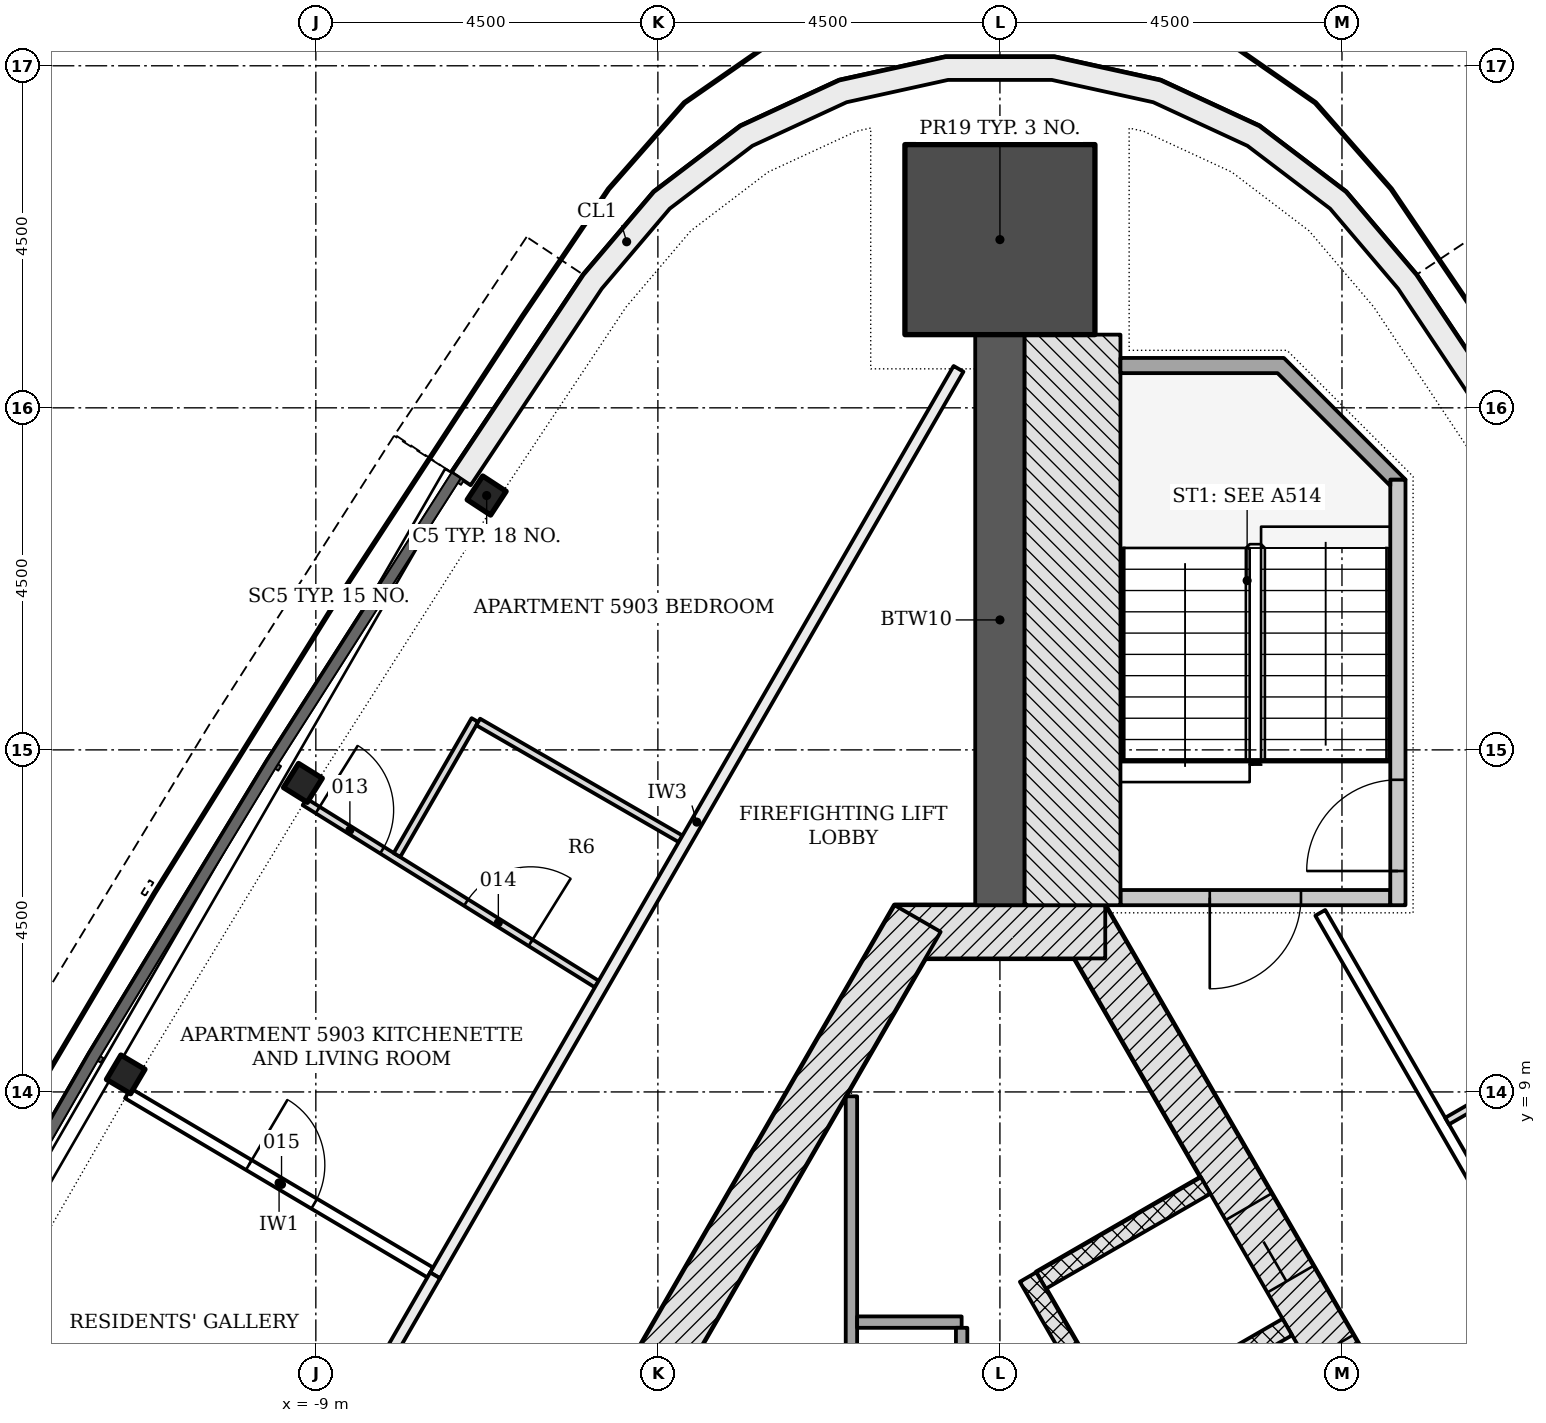
"""IFC4 building model, lengths in metres.
Left out: names, types, materials, properties, quantities, classifications, styles, units other than length and angle.
Written with IfcOpenShell. Run it as: python <this file> out.ifc"""

import sys

from ifc_helpers import new_model, si_unit, direction, frame, frame_2d, origin, origin_2d, place, context, subcontext, project, spatial, polyline, rectangle, i_section, outline, extrude, element, fill, save


model = new_model("IFC4")
c1 = context("Model", 3, precision=1e-05, world=origin(), true_north=direction((0.0, 1.0)))
c2 = subcontext(c1, "Body", "Model", "MODEL_VIEW")
j1 = project(units=[si_unit("LENGTHUNIT", "METRE"), si_unit("PLANEANGLEUNIT", "RADIAN")], contexts=[c1])
p1 = place(None, origin())
s1 = spatial("IfcSite", under=j1, at=p1, CompositionType="ELEMENT")
p2 = place(p1, origin())
s2 = spatial("IfcBuilding", under=s1, at=p2, CompositionType="ELEMENT")
p3 = place(p2, frame((0.0, 0.0, 229.2)))
s3 = spatial("IfcBuildingStorey", under=s2, at=p3, CompositionType="ELEMENT", Elevation=229.2)
p4 = place(p3, frame((10.311, -4.703, -0.2), z_axis=(0.0, 0.0, 1.0), x_axis=(-0.500001446645, 0.866024568562, 0.0)))
e1 = element("IfcWall", 1, at=p4, inside=s3, PredefinedType="SHEAR", context=c2, shape_type="SweptSolid", body=[
    extrude(rectangle(XDim=18.458, YDim=0.7, at=frame_2d((9.229, 0.0))), origin(), (0.0, 0.0, 1.0), 3.6),
])
p5 = place(p4, frame((4.379, 0.0, 0.2)))
e2 = element("IfcOpeningElement", 2, at=p5, cuts=e1, PredefinedType="OPENING", context=c2, shape_type="SweptSolid", body=[
    extrude(rectangle(XDim=1.1, YDim=2.1, at=frame_2d((0.55, 1.05))), frame((0.0, 0.36, 0.0), z_axis=(0.0, -1.0, 0.0), x_axis=(1.0, 0.0, 0.0)), (0.0, 0.0, 1.0), 0.72),
])
p6 = place(p4, frame((6.529, 0.0, 0.2)))
e3 = element("IfcOpeningElement", 3, at=p6, cuts=e1, PredefinedType="OPENING", context=c2, shape_type="SweptSolid", body=[
    extrude(rectangle(XDim=1.1, YDim=2.1, at=frame_2d((0.55, 1.05))), frame((0.0, 0.36, 0.0), z_axis=(0.0, -1.0, 0.0), x_axis=(1.0, 0.0, 0.0)), (0.0, 0.0, 1.0), 0.72),
])
p7 = place(p4, frame((8.679, 0.0, 0.2)))
e4 = element("IfcOpeningElement", 4, at=p7, cuts=e1, PredefinedType="OPENING", context=c2, shape_type="SweptSolid", body=[
    extrude(rectangle(XDim=1.1, YDim=2.1, at=frame_2d((0.55, 1.05))), frame((0.0, 0.36, 0.0), z_axis=(0.0, -1.0, 0.0), x_axis=(1.0, 0.0, 0.0)), (0.0, 0.0, 1.0), 0.72),
])
p8 = place(p4, frame((10.829, 0.0, 0.2)))
e5 = element("IfcOpeningElement", 5, at=p8, cuts=e1, PredefinedType="OPENING", context=c2, shape_type="SweptSolid", body=[
    extrude(rectangle(XDim=1.1, YDim=2.1, at=frame_2d((0.55, 1.05))), frame((0.0, 0.36, 0.0), z_axis=(0.0, -1.0, 0.0), x_axis=(1.0, 0.0, 0.0)), (0.0, 0.0, 1.0), 0.72),
])
p9 = place(p4, frame((12.979, 0.0, 0.2)))
e6 = element("IfcOpeningElement", 6, at=p9, cuts=e1, PredefinedType="OPENING", context=c2, shape_type="SweptSolid", body=[
    extrude(rectangle(XDim=1.1, YDim=2.1, at=frame_2d((0.55, 1.05))), frame((0.0, 0.36, 0.0), z_axis=(0.0, -1.0, 0.0), x_axis=(1.0, 0.0, 0.0)), (0.0, 0.0, 1.0), 0.72),
])
p10 = place(p3, frame((1.386, 11.106, -0.2), z_axis=(0.0, 0.0, 1.0), x_axis=(-1.0, 0.0, 0.0)))
e7 = element("IfcWall", 7, at=p10, inside=s3, PredefinedType="SHEAR", context=c2, shape_type="SweptSolid", body=[
    extrude(rectangle(XDim=2.771, YDim=0.7, at=frame_2d((1.386, 0.0))), origin(), (0.0, 0.0, 1.0), 3.6),
])
p11 = place(p3, frame((-1.083, 11.281, -0.2), z_axis=(0.0, 0.0, 1.0), x_axis=(-0.500001446645, -0.866024568562, 0.0)))
e8 = element("IfcWall", 8, at=p11, inside=s3, PredefinedType="SHEAR", context=c2, shape_type="SweptSolid", body=[
    extrude(rectangle(XDim=18.458, YDim=0.7, at=frame_2d((9.229, 0.0))), origin(), (0.0, 0.0, 1.0), 3.6),
])
p12 = place(p11, frame((8.979, 0.0, 0.2)))
e9 = element("IfcOpeningElement", 9, at=p12, cuts=e8, PredefinedType="OPENING", context=c2, shape_type="SweptSolid", body=[
    extrude(rectangle(XDim=1.2, YDim=2.1, at=frame_2d((0.6, 1.05))), frame((0.0, 0.36, 0.0), z_axis=(0.0, -1.0, 0.0), x_axis=(1.0, 0.0, 0.0)), (0.0, 0.0, 1.0), 0.72),
])
p13 = place(p11, frame((11.029, 0.0, 0.2)))
e10 = element("IfcOpeningElement", 10, at=p13, cuts=e8, PredefinedType="OPENING", context=c2, shape_type="SweptSolid", body=[
    extrude(rectangle(XDim=1.2, YDim=2.1, at=frame_2d((0.6, 1.05))), frame((0.0, 0.36, 0.0), z_axis=(0.0, -1.0, 0.0), x_axis=(1.0, 0.0, 0.0)), (0.0, 0.0, 1.0), 0.72),
])
p14 = place(p3, frame((0.0, 11.456, -0.2), z_axis=(0.0, 0.0, 1.0), x_axis=(0.0, 1.0, 0.0)))
e11 = element("IfcWall", 11, at=p14, inside=s3, PredefinedType="SHEAR", context=c2, shape_type="SweptSolid", body=[
    extrude(rectangle(XDim=7.507, YDim=0.65, at=frame_2d((3.753, 0.0))), origin(), (0.0, 0.0, 1.0), 3.6),
])
p15 = place(p3, frame((0.0, 20.213, -0.2), z_axis=(0.0, 0.0, 1.0), x_axis=(0.0, 1.0, 0.0)))
e12 = element("IfcColumn", 12, at=p15, inside=s3, PredefinedType="COLUMN", context=c2, shape_type="SweptSolid", body=[
    extrude(rectangle(XDim=2.5, YDim=2.5, at=origin_2d()), origin(), (0.0, 0.0, 1.0), 3.6),
])
for number, where, z_axis, x_axis in (
    (13, (-6.753, 16.846, -0.2), (0.0, 0.0, 1.0), (-0.548, -0.836, 0.0)),
    (14, (-9.17, 13.065, -0.2), (0.0, 0.0, 1.0), (-0.529, -0.849, 0.0)),
    (15, (-11.501, 9.231, -0.2), (0.0, 0.0, 1.0), (-0.51, -0.86, 0.0)),
):
    element("IfcColumn", number, at=place(p3, frame(where, z_axis=z_axis, x_axis=x_axis)), inside=s3, PredefinedType="COLUMN", context=c2, shape_type="SweptSolid", body=[
        extrude(i_section(OverallWidth=0.373, OverallDepth=0.368, WebThickness=0.015, FlangeThickness=0.024, FilletRadius=0.015, at=origin_2d()), origin(), (0.0, 0.0, 1.0), 3.6),
    ])
p16 = place(p3, origin())
e16 = element("IfcWall", 16, at=p16, inside=s3, PredefinedType="NOTDEFINED", context=c2, shape_type="SweptSolid", body=[
    extrude(outline(polyline([(7.213, 17.148), (5.478, 19.749), (4.551, 20.84), (3.412, 21.706), (2.113, 22.306), (0.716, 22.614), (-0.716, 22.614), (-2.113, 22.306), (-3.412, 21.706), (-4.551, 20.84), (-5.478, 19.749), (-7.213, 17.148), (-6.963, 16.981), (-5.238, 19.568), (-4.344, 20.621), (-3.256, 21.447), (-2.017, 22.021), (-0.683, 22.314), (0.683, 22.314), (2.017, 22.021), (3.256, 21.447), (4.344, 20.621), (5.238, 19.568), (6.963, 16.981), (7.213, 17.148)])), origin(), (0.0, 0.0, 1.0), 3.3),
])
for number, where, z_axis, x_axis in (
    (17, (3.781, 5.907, -0.2), (0.0, 0.0, 1.0), (-0.866, -0.5, 0.0)),
    (18, (2.706, 7.769, -0.2), (0.0, 0.0, 1.0), (-0.866, -0.5, 0.0)),
):
    element("IfcWall", number, at=place(p3, frame(where, z_axis=z_axis, x_axis=x_axis)), inside=s3, PredefinedType="PARTITIONING", context=c2, shape_type="SweptSolid", body=[
        extrude(rectangle(XDim=2.5, YDim=0.25, at=frame_2d((1.25, 0.0))), origin(), (0.0, 0.0, 1.0), 3.6),
    ])
p17 = place(p3, frame((5.87, -2.961, 0.0), z_axis=(0.0, 0.0, 1.0), x_axis=(-0.50000615651, 0.866021849293, 0.0)))
e19 = element("IfcWall", 19, at=p17, inside=s3, PredefinedType="PARTITIONING", context=c2, shape_type="SweptSolid", body=[
    extrude(rectangle(XDim=11.0, YDim=0.25, at=frame_2d((5.5, 0.0))), origin(), (0.0, 0.0, 1.0), 3.4),
])
p18 = place(p3, frame((-1.954, 8.942, 0.0), z_axis=(0.0, 0.0, 1.0), x_axis=(0.0, -1.0, 0.0)))
e20 = element("IfcWall", 20, at=p18, inside=s3, PredefinedType="PARTITIONING", context=c2, shape_type="SweptSolid", body=[
    extrude(rectangle(XDim=15.171, YDim=0.15, at=frame_2d((7.585, 0.0))), origin(), (0.0, 0.0, 1.0), 3.4),
])
p19 = place(p18, frame((7.121, 0.0, 0.0)))
e21 = element("IfcOpeningElement", 21, at=p19, cuts=e20, PredefinedType="OPENING", context=c2, shape_type="SweptSolid", body=[
    extrude(rectangle(XDim=0.9, YDim=2.1, at=frame_2d((0.45, 1.05))), frame((0.0, 0.085, 0.0), z_axis=(0.0, -1.0, 0.0), x_axis=(1.0, 0.0, 0.0)), (0.0, 0.0, 1.0), 0.17),
])
p20 = place(p3, frame((-1.879, 5.972, 0.0), z_axis=(0.0, 0.0, 1.0), x_axis=(1.0, 0.0, 0.0)))
e22 = element("IfcWall", 22, at=p20, inside=s3, PredefinedType="PARTITIONING", context=c2, shape_type="SweptSolid", body=[
    extrude(rectangle(XDim=1.375, YDim=0.15, at=frame_2d((0.688, 0.0))), origin(), (0.0, 0.0, 1.0), 3.4),
])
p21 = place(p3, frame((-0.504, 5.897, 0.0), z_axis=(0.0, 0.0, 1.0), x_axis=(0.0, -1.0, 0.0)))
e23 = element("IfcWall", 23, at=p21, inside=s3, PredefinedType="PARTITIONING", context=c2, shape_type="SweptSolid", body=[
    extrude(rectangle(XDim=12.125, YDim=0.15, at=frame_2d((6.062, 0.0))), origin(), (0.0, 0.0, 1.0), 3.4),
])
p22 = place(p21, frame((4.114, 0.0, 0.0)))
e24 = element("IfcOpeningElement", 24, at=p22, cuts=e23, PredefinedType="OPENING", context=c2, shape_type="SweptSolid", body=[
    extrude(rectangle(XDim=0.9, YDim=2.1, at=frame_2d((0.45, 1.05))), frame((0.0, 0.085, 0.0), z_axis=(0.0, -1.0, 0.0), x_axis=(1.0, 0.0, 0.0)), (0.0, 0.0, 1.0), 0.17),
])
p23 = place(p3, frame((5.135, 11.556, -0.2), z_axis=(0.0, 0.0, 1.0), x_axis=(-1.0, 0.0, 0.0)))
e25 = element("IfcWall", 25, at=p23, inside=s3, PredefinedType="SHEAR", context=c2, shape_type="SweptSolid", body=[
    extrude(rectangle(XDim=3.55, YDim=0.2, at=frame_2d((1.775, 0.0))), origin(), (0.0, 0.0, 1.0), 3.6),
])
p24 = place(p23, frame((1.175, 0.0, 0.2)))
e26 = element("IfcOpeningElement", 26, at=p24, cuts=e25, PredefinedType="OPENING", context=c2, shape_type="SweptSolid", body=[
    extrude(rectangle(XDim=1.2, YDim=2.1, at=frame_2d((0.6, 1.05))), frame((0.0, 0.11, 0.0), z_axis=(0.0, -1.0, 0.0), x_axis=(1.0, 0.0, 0.0)), (0.0, 0.0, 1.0), 0.22),
])
p25 = place(p3, frame((5.236, 11.456, -0.2), z_axis=(0.0, 0.0, 1.0), x_axis=(0.0, 1.0, 0.0)))
e27 = element("IfcWall", 27, at=p25, inside=s3, PredefinedType="SHEAR", context=c2, shape_type="SweptSolid", body=[
    extrude(rectangle(XDim=5.6, YDim=0.2, at=frame_2d((2.8, 0.0))), origin(), (0.0, 0.0, 1.0), 3.6),
])
p26 = place(p25, frame((0.45, 0.0, 0.2)))
e28 = element("IfcOpeningElement", 28, at=p26, cuts=e27, PredefinedType="OPENING", context=c2, shape_type="SweptSolid", body=[
    extrude(rectangle(XDim=1.2, YDim=2.1, at=frame_2d((0.6, 1.05))), frame((0.0, 0.11, 0.0), z_axis=(0.0, -1.0, 0.0), x_axis=(1.0, 0.0, 0.0)), (0.0, 0.0, 1.0), 0.22),
])
p27 = place(p3, frame((0.955, 11.456, -0.2), z_axis=(0.0, 0.0, 1.0), x_axis=(0.0, 1.0, 0.0)))
e29 = element("IfcWall", 29, at=p27, inside=s3, PredefinedType="SHEAR", context=c2, shape_type="SweptSolid", body=[
    extrude(rectangle(XDim=7.507, YDim=1.261, at=frame_2d((3.753, 0.0))), origin(), (0.0, 0.0, 1.0), 3.6),
])
p28 = place(p3, frame((0.0, 0.0, -0.2)))
e30 = element("IfcWall", 30, at=p28, inside=s3, PredefinedType="SHEAR", context=c2, shape_type="SweptSolid", body=[
    extrude(outline(polyline([(5.336, 17.056), (3.736, 18.656), (1.586, 18.656), (1.586, 18.456), (3.653, 18.456), (5.135, 16.974), (5.135, 17.056), (5.135, 17.056), (5.135, 17.056), (5.135, 17.056), (5.135, 17.056), (5.135, 17.056), (5.135, 17.056), (5.135, 17.056), (5.135, 17.056), (5.135, 17.056), (5.135, 17.056), (5.135, 17.056), (5.135, 17.056), (5.135, 17.056), (5.135, 17.056), (5.135, 17.056), (5.135, 17.056), (5.336, 17.056)])), origin(), (0.0, 0.0, 1.0), 3.6),
])
p29 = place(p3, frame((6.886, 6.729, 0.0), z_axis=(0.0, 0.0, 1.0), x_axis=(-0.4999966759, 0.866027322946, 0.0)))
e31 = element("IfcWall", 31, at=p29, inside=s3, PredefinedType="PARTITIONING", context=c2, shape_type="SweptSolid", body=[
    extrude(rectangle(XDim=5.343, YDim=0.15, at=frame_2d((2.672, 0.0))), origin(), (0.0, 0.0, 1.0), 2.852),
])
p30 = place(p3, frame((8.546, 10.154, 0.0), z_axis=(0.0, 0.0, 1.0), x_axis=(-0.866016353143, -0.500015675843, 0.0)))
e32 = element("IfcWall", 32, at=p30, inside=s3, PredefinedType="PARTITIONING", context=c2, shape_type="SweptSolid", body=[
    extrude(rectangle(XDim=3.075, YDim=0.1, at=frame_2d((1.538, 0.0))), origin(), (0.0, 0.0, 1.0), 3.4),
])
p31 = place(p30, frame((1.05, 0.0, 0.0)))
e33 = element("IfcOpeningElement", 33, at=p31, cuts=e32, PredefinedType="OPENING", context=c2, shape_type="SweptSolid", body=[
    extrude(rectangle(XDim=1.0, YDim=2.1, at=frame_2d((0.5, 1.05))), frame((0.0, 0.06, 0.0), z_axis=(0.0, -1.0, 0.0), x_axis=(1.0, 0.0, 0.0)), (0.0, 0.0, 1.0), 0.12),
])
p32 = place(p3, frame((-0.545, 18.513, 0.0), z_axis=(0.0, 0.0, 1.0), x_axis=(-0.499998165157, -0.866026463129, 0.0)))
e34 = element("IfcWall", 34, at=p32, inside=s3, PredefinedType="PARTITIONING", context=c2, shape_type="SweptSolid", body=[
    extrude(rectangle(XDim=13.771, YDim=0.15, at=frame_2d((6.886, 0.0))), origin(), (0.0, 0.0, 1.0), 2.852),
])
p33 = place(p3, frame((-11.472, 8.981, 0.0), z_axis=(0.0, 0.0, 1.0), x_axis=(0.860336137803, -0.509727113257, 0.0)))
e35 = element("IfcWall", 35, at=p33, inside=s3, PredefinedType="PARTITIONING", context=c2, shape_type="SweptSolid", body=[
    extrude(rectangle(XDim=4.623, YDim=0.15, at=frame_2d((2.312, 0.0))), origin(), (0.0, 0.0, 1.0), 3.4),
])
p34 = place(p33, frame((1.849, 0.0, 0.0)))
e36 = element("IfcOpeningElement", 36, at=p34, cuts=e35, PredefinedType="OPENING", context=c2, shape_type="SweptSolid", body=[
    extrude(rectangle(XDim=1.0, YDim=2.1, at=frame_2d((0.5, 1.05))), frame((0.0, 0.085, 0.0), z_axis=(0.0, -1.0, 0.0), x_axis=(1.0, 0.0, 0.0)), (0.0, 0.0, 1.0), 0.17),
])
p35 = place(p3, frame((-7.43, 6.586, 0.0), z_axis=(0.0, 0.0, 1.0), x_axis=(-0.500037854553, -0.866003547345, 0.0)))
e37 = element("IfcWall", 37, at=p35, inside=s3, PredefinedType="PARTITIONING", context=c2, shape_type="SweptSolid", body=[
    extrude(rectangle(XDim=4.378, YDim=0.15, at=frame_2d((2.189, 0.0))), origin(), (0.0, 0.0, 1.0), 2.852),
])
p36 = place(p35, frame((1.689, 0.0, 0.0)))
e38 = element("IfcOpeningElement", 38, at=p36, cuts=e37, PredefinedType="OPENING", context=c2, shape_type="SweptSolid", body=[
    extrude(rectangle(XDim=1.0, YDim=2.1, at=frame_2d((0.5, 1.05))), frame((0.0, 0.085, 0.0), z_axis=(0.0, -1.0, 0.0), x_axis=(1.0, 0.0, 0.0)), (0.0, 0.0, 1.0), 0.17),
])
p37 = place(p3, frame((-9.146, 12.815, 0.0), z_axis=(0.0, 0.0, 1.0), x_axis=(0.848537029676, -0.52913600262, 0.0)))
e39 = element("IfcWall", 39, at=p37, inside=s3, PredefinedType="PARTITIONING", context=c2, shape_type="SweptSolid", body=[
    extrude(rectangle(XDim=4.528, YDim=0.1, at=frame_2d((2.264, 0.0))), origin(), (0.0, 0.0, 1.0), 3.4),
])
p38 = place(p37, frame((0.201, 0.0, 0.0)))
e40 = element("IfcOpeningElement", 40, at=p38, cuts=e39, PredefinedType="OPENING", context=c2, shape_type="SweptSolid", body=[
    extrude(rectangle(XDim=1.0, YDim=2.1, at=frame_2d((0.5, 1.05))), frame((0.0, 0.06, 0.0), z_axis=(0.0, -1.0, 0.0), x_axis=(1.0, 0.0, 0.0)), (0.0, 0.0, 1.0), 0.12),
])
p39 = place(p37, frame((2.502, 0.0, 0.0)))
e41 = element("IfcOpeningElement", 41, at=p39, cuts=e39, PredefinedType="OPENING", context=c2, shape_type="SweptSolid", body=[
    extrude(rectangle(XDim=1.0, YDim=2.1, at=frame_2d((0.5, 1.05))), frame((0.0, 0.06, 0.0), z_axis=(0.0, -1.0, 0.0), x_axis=(1.0, 0.0, 0.0)), (0.0, 0.0, 1.0), 0.12),
])
p40 = place(p3, frame((-7.932, 12.117, 0.0), z_axis=(0.0, 0.0, 1.0), x_axis=(0.499956128963, 0.866050731258, 0.0)))
e42 = element("IfcWall", 42, at=p40, inside=s3, PredefinedType="PARTITIONING", context=c2, shape_type="SweptSolid", body=[
    extrude(rectangle(XDim=2.05, YDim=0.1, at=frame_2d((1.025, 0.0))), origin(), (0.0, 0.0, 1.0), 2.852),
])
p41 = place(p3, frame((-6.864, 13.867, 0.0), z_axis=(0.0, 0.0, 1.0), x_axis=(0.866016353143, -0.500015675843, 0.0)))
e43 = element("IfcWall", 43, at=p41, inside=s3, PredefinedType="PARTITIONING", context=c2, shape_type="SweptSolid", body=[
    extrude(rectangle(XDim=3.075, YDim=0.1, at=frame_2d((1.538, 0.0))), origin(), (0.0, 0.0, 1.0), 3.4),
])
p42 = place(p9, origin())
e44 = element("IfcDoor", 44, at=p42, inside=s3, OperationType="DOUBLE_DOOR_SLIDING", PredefinedType="DOOR", context=c2, shape_type="SweptSolid", body=[
    extrude(rectangle(XDim=1.1, YDim=2.1, at=frame_2d((0.55, 1.05))), frame((0.0, 0.025, 0.0), z_axis=(0.0, -1.0, 0.0), x_axis=(1.0, 0.0, 0.0)), (0.0, 0.0, 1.0), 0.05),
])
fill(e6, e44)
p43 = place(p24, origin())
e45 = element("IfcDoor", 45, at=p43, inside=s3, OperationType="SINGLE_SWING_RIGHT", PredefinedType="DOOR", context=c2, shape_type="SweptSolid", body=[
    extrude(rectangle(XDim=1.2, YDim=2.1, at=frame_2d((0.6, 1.05))), frame((0.0, 0.025, 0.0), z_axis=(0.0, -1.0, 0.0), x_axis=(1.0, 0.0, 0.0)), (0.0, 0.0, 1.0), 0.05),
])
fill(e26, e45)
p44 = place(p26, origin())
e46 = element("IfcDoor", 46, at=p44, inside=s3, OperationType="SINGLE_SWING_LEFT", PredefinedType="DOOR", context=c2, shape_type="SweptSolid", body=[
    extrude(rectangle(XDim=1.2, YDim=2.1, at=frame_2d((0.6, 1.05))), frame((0.0, 0.025, 0.0), z_axis=(0.0, -1.0, 0.0), x_axis=(1.0, 0.0, 0.0)), (0.0, 0.0, 1.0), 0.05),
])
fill(e28, e46)
p45 = place(p38, origin())
e47 = element("IfcDoor", 47, at=p45, inside=s3, OperationType="SINGLE_SWING_LEFT", PredefinedType="DOOR", context=c2, shape_type="SweptSolid", body=[
    extrude(rectangle(XDim=1.0, YDim=2.1, at=frame_2d((0.5, 1.05))), frame((0.0, 0.025, 0.0), z_axis=(0.0, -1.0, 0.0), x_axis=(1.0, 0.0, 0.0)), (0.0, 0.0, 1.0), 0.05),
])
fill(e40, e47)
p46 = place(p39, origin())
e48 = element("IfcDoor", 48, at=p46, inside=s3, OperationType="SINGLE_SWING_RIGHT", PredefinedType="DOOR", context=c2, shape_type="SweptSolid", body=[
    extrude(rectangle(XDim=1.0, YDim=2.1, at=frame_2d((0.5, 1.05))), frame((0.0, 0.025, 0.0), z_axis=(0.0, -1.0, 0.0), x_axis=(1.0, 0.0, 0.0)), (0.0, 0.0, 1.0), 0.05),
])
fill(e41, e48)
p47 = place(p34, origin())
e49 = element("IfcDoor", 49, at=p47, inside=s3, OperationType="SINGLE_SWING_LEFT", PredefinedType="DOOR", context=c2, shape_type="SweptSolid", body=[
    extrude(rectangle(XDim=1.0, YDim=2.1, at=frame_2d((0.5, 1.05))), frame((0.0, 0.025, 0.0), z_axis=(0.0, -1.0, 0.0), x_axis=(1.0, 0.0, 0.0)), (0.0, 0.0, 1.0), 0.05),
])
fill(e36, e49)
save(model, sys.argv[1])
